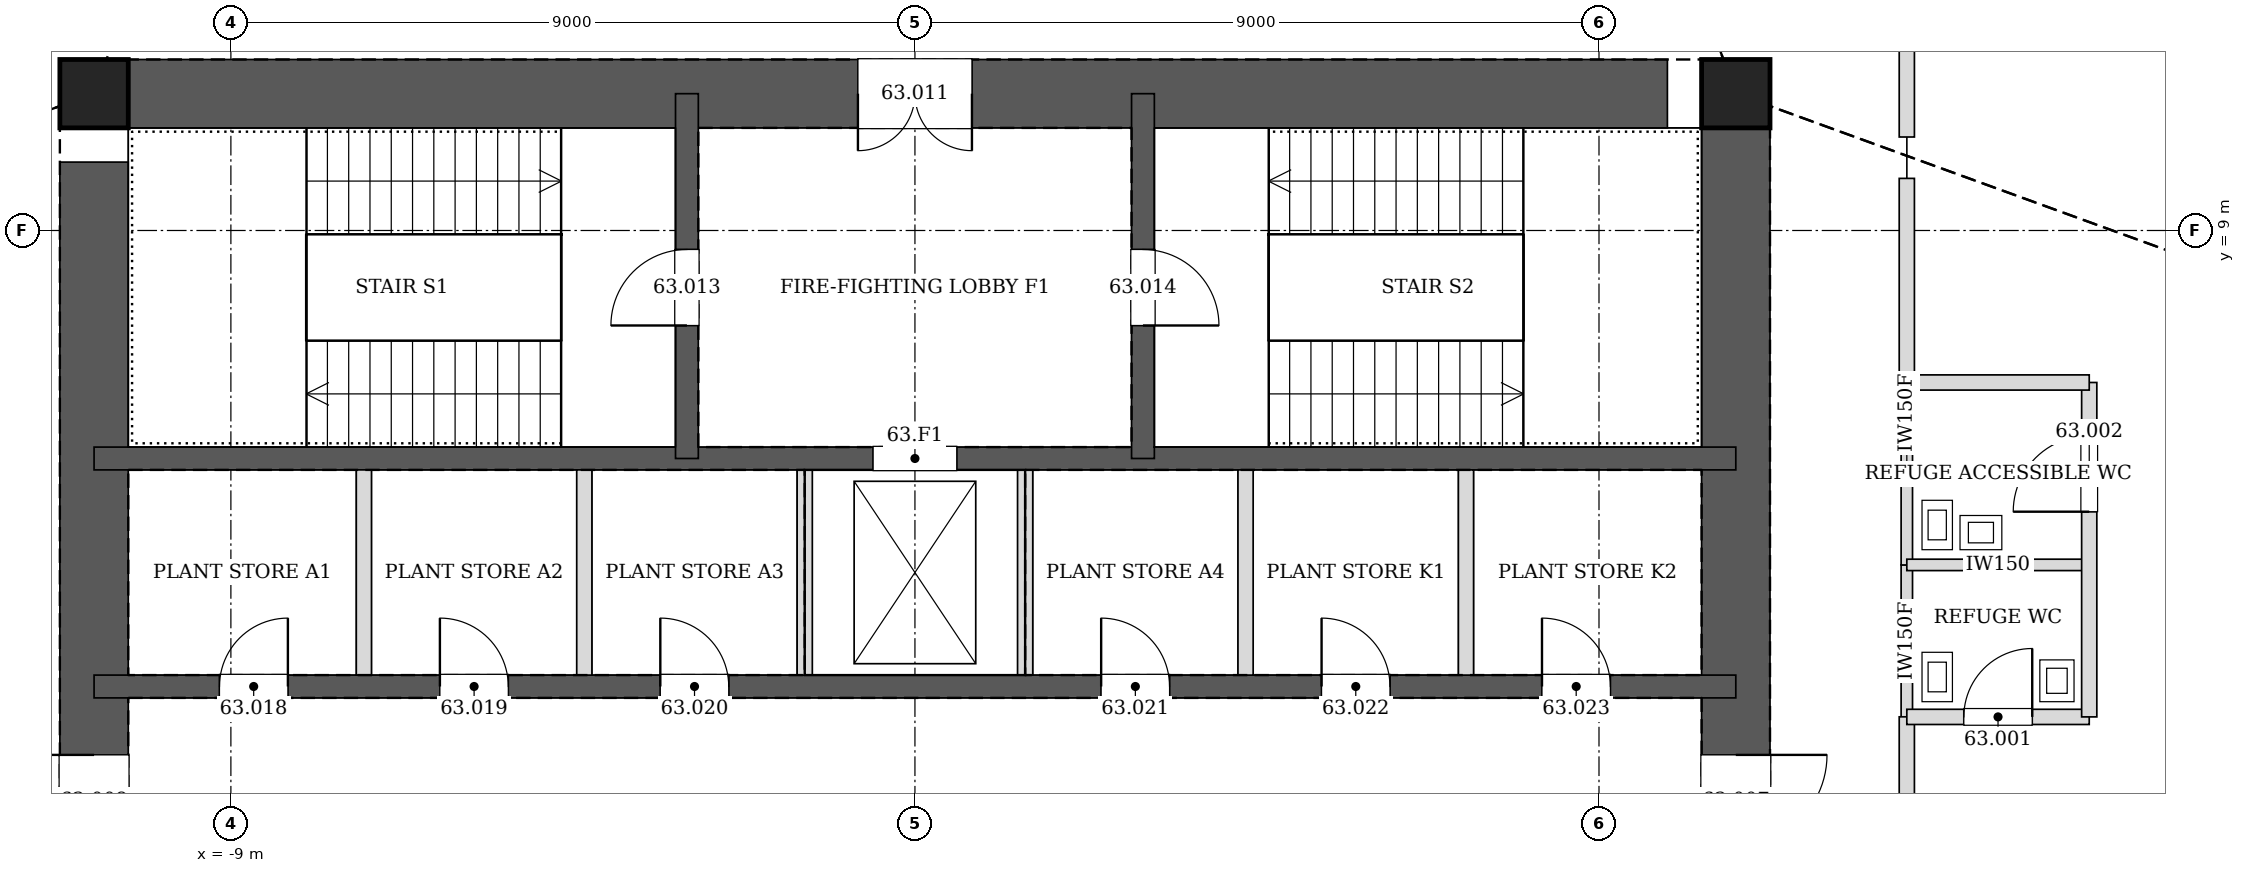
"""IFC4 building model, lengths in metres.
Left out: names, types, materials, properties, quantities, classifications, styles, units other than length and angle.
Written with IfcOpenShell. Run it as: python <this file> out.ifc"""

import sys

from ifc_helpers import new_model, si_unit, direction, frame, frame_2d, origin, origin_2d, place, context, subcontext, project, spatial, rectangle, hollow_rectangle, extrude, element, fill, save


model = new_model("IFC4")
c1 = context("Model", 3, precision=1e-05, world=origin(), true_north=direction((0.0, 1.0)))
c2 = subcontext(c1, "Body", "Model", "MODEL_VIEW")
j1 = project(units=[si_unit("LENGTHUNIT", "METRE"), si_unit("PLANEANGLEUNIT", "RADIAN")], contexts=[c1])
p1 = place(None, origin())
s1 = spatial("IfcSite", under=j1, at=p1, CompositionType="ELEMENT")
p2 = place(p1, origin())
s2 = spatial("IfcBuilding", under=s1, at=p2, CompositionType="ELEMENT")
p3 = place(p2, frame((0.0, 0.0, 261.8)))
s3 = spatial("IfcBuildingStorey", under=s2, at=p3, CompositionType="ELEMENT", Elevation=261.8)
for number, where, z_axis, x_axis in (
    (1, (10.8, 10.8, 0.0), (0.0, 0.0, 1.0), (1.0, 0.0, 0.0)),
    (2, (-10.8, 10.8, 0.0), (0.0, 0.0, 1.0), (1.0, 0.0, 0.0)),
):
    element("IfcColumn", number, at=place(p3, frame(where, z_axis=z_axis, x_axis=x_axis)), inside=s3, PredefinedType="COLUMN", context=c2, shape_type="SweptSolid", body=[
        extrude(hollow_rectangle(XDim=0.9, YDim=0.9, WallThickness=0.04, at=origin_2d()), origin(), (0.0, 0.0, 1.0), 4.5),
    ])
p4 = place(p3, frame((10.8, -10.8, 0.0), z_axis=(0.0, 0.0, 1.0), x_axis=(0.0, 1.0, 0.0)))
e3 = element("IfcWall", 3, at=p4, inside=s3, PredefinedType="SOLIDWALL", context=c2, shape_type="SweptSolid", body=[
    extrude(rectangle(XDim=21.6, YDim=0.9, at=frame_2d((10.8, 0.0))), origin(), (0.0, 0.0, 1.0), 4.5),
])
p5 = place(p4, frame((11.7, 0.0, 0.0)))
e4 = element("IfcOpeningElement", 4, at=p5, cuts=e3, PredefinedType="OPENING", context=c2, shape_type="SweptSolid", body=[
    extrude(rectangle(XDim=1.2, YDim=2.1, at=frame_2d((0.6, 1.05))), frame((0.0, 0.46, 0.0), z_axis=(0.0, -1.0, 0.0), x_axis=(1.0, 0.0, 0.0)), (0.0, 0.0, 1.0), 0.92),
])
p6 = place(p4, frame((8.7, 0.0, 0.0)))
e5 = element("IfcOpeningElement", 5, at=p6, cuts=e3, PredefinedType="OPENING", context=c2, shape_type="SweptSolid", body=[
    extrude(rectangle(XDim=1.2, YDim=2.1, at=frame_2d((0.6, 1.05))), frame((0.0, 0.46, 0.0), z_axis=(0.0, -1.0, 0.0), x_axis=(1.0, 0.0, 0.0)), (0.0, 0.0, 1.0), 0.92),
])
p7 = place(p3, frame((10.8, 10.8, 0.0), z_axis=(0.0, 0.0, 1.0), x_axis=(-1.0, 0.0, 0.0)))
e6 = element("IfcWall", 6, at=p7, inside=s3, PredefinedType="SOLIDWALL", context=c2, shape_type="SweptSolid", body=[
    extrude(rectangle(XDim=21.6, YDim=0.9, at=frame_2d((10.8, 0.0))), origin(), (0.0, 0.0, 1.0), 4.5),
])
p8 = place(p7, frame((10.05, 0.0, 0.0)))
e7 = element("IfcOpeningElement", 7, at=p8, cuts=e6, PredefinedType="OPENING", context=c2, shape_type="SweptSolid", body=[
    extrude(rectangle(XDim=1.5, YDim=2.1, at=frame_2d((0.75, 1.05))), frame((0.0, 0.46, 0.0), z_axis=(0.0, -1.0, 0.0), x_axis=(1.0, 0.0, 0.0)), (0.0, 0.0, 1.0), 0.92),
])
p9 = place(p3, frame((-10.8, 10.8, 0.0), z_axis=(0.0, 0.0, 1.0), x_axis=(0.0, -1.0, 0.0)))
e8 = element("IfcWall", 8, at=p9, inside=s3, PredefinedType="SOLIDWALL", context=c2, shape_type="SweptSolid", body=[
    extrude(rectangle(XDim=21.6, YDim=0.9, at=frame_2d((10.8, 0.0))), origin(), (0.0, 0.0, 1.0), 4.5),
])
p10 = place(p9, frame((8.7, 0.0, 0.0)))
e9 = element("IfcOpeningElement", 9, at=p10, cuts=e8, PredefinedType="OPENING", context=c2, shape_type="SweptSolid", body=[
    extrude(rectangle(XDim=1.2, YDim=2.1, at=frame_2d((0.6, 1.05))), frame((0.0, 0.46, 0.0), z_axis=(0.0, -1.0, 0.0), x_axis=(1.0, 0.0, 0.0)), (0.0, 0.0, 1.0), 0.92),
])
p11 = place(p9, frame((11.7, 0.0, 0.0)))
e10 = element("IfcOpeningElement", 10, at=p11, cuts=e8, PredefinedType="OPENING", context=c2, shape_type="SweptSolid", body=[
    extrude(rectangle(XDim=1.2, YDim=2.1, at=frame_2d((0.6, 1.05))), frame((0.0, 0.46, 0.0), z_axis=(0.0, -1.0, 0.0), x_axis=(1.0, 0.0, 0.0)), (0.0, 0.0, 1.0), 0.92),
])
p12 = place(p3, frame((-10.8, 3.0, 0.0), z_axis=(0.0, 0.0, 1.0), x_axis=(1.0, 0.0, 0.0)))
e11 = element("IfcWall", 11, at=p12, inside=s3, PredefinedType="SOLIDWALL", context=c2, shape_type="SweptSolid", body=[
    extrude(rectangle(XDim=21.6, YDim=0.3, at=frame_2d((10.8, 0.0))), origin(), (0.0, 0.0, 1.0), 4.5),
])
p13 = place(p12, frame((1.65, 0.0, 0.0)))
e12 = element("IfcOpeningElement", 12, at=p13, cuts=e11, PredefinedType="OPENING", context=c2, shape_type="SweptSolid", body=[
    extrude(rectangle(XDim=0.9, YDim=2.1, at=frame_2d((0.45, 1.05))), frame((0.0, 0.16, 0.0), z_axis=(0.0, -1.0, 0.0), x_axis=(1.0, 0.0, 0.0)), (0.0, 0.0, 1.0), 0.32),
])
p14 = place(p12, frame((4.55, 0.0, 0.0)))
e13 = element("IfcOpeningElement", 13, at=p14, cuts=e11, PredefinedType="OPENING", context=c2, shape_type="SweptSolid", body=[
    extrude(rectangle(XDim=0.9, YDim=2.1, at=frame_2d((0.45, 1.05))), frame((0.0, 0.16, 0.0), z_axis=(0.0, -1.0, 0.0), x_axis=(1.0, 0.0, 0.0)), (0.0, 0.0, 1.0), 0.32),
])
p15 = place(p12, frame((7.45, 0.0, 0.0)))
e14 = element("IfcOpeningElement", 14, at=p15, cuts=e11, PredefinedType="OPENING", context=c2, shape_type="SweptSolid", body=[
    extrude(rectangle(XDim=0.9, YDim=2.1, at=frame_2d((0.45, 1.05))), frame((0.0, 0.16, 0.0), z_axis=(0.0, -1.0, 0.0), x_axis=(1.0, 0.0, 0.0)), (0.0, 0.0, 1.0), 0.32),
])
p16 = place(p12, frame((13.25, 0.0, 0.0)))
e15 = element("IfcOpeningElement", 15, at=p16, cuts=e11, PredefinedType="OPENING", context=c2, shape_type="SweptSolid", body=[
    extrude(rectangle(XDim=0.9, YDim=2.1, at=frame_2d((0.45, 1.05))), frame((0.0, 0.16, 0.0), z_axis=(0.0, -1.0, 0.0), x_axis=(1.0, 0.0, 0.0)), (0.0, 0.0, 1.0), 0.32),
])
p17 = place(p12, frame((16.15, 0.0, 0.0)))
e16 = element("IfcOpeningElement", 16, at=p17, cuts=e11, PredefinedType="OPENING", context=c2, shape_type="SweptSolid", body=[
    extrude(rectangle(XDim=0.9, YDim=2.1, at=frame_2d((0.45, 1.05))), frame((0.0, 0.16, 0.0), z_axis=(0.0, -1.0, 0.0), x_axis=(1.0, 0.0, 0.0)), (0.0, 0.0, 1.0), 0.32),
])
p18 = place(p12, frame((19.05, 0.0, 0.0)))
e17 = element("IfcOpeningElement", 17, at=p18, cuts=e11, PredefinedType="OPENING", context=c2, shape_type="SweptSolid", body=[
    extrude(rectangle(XDim=0.9, YDim=2.1, at=frame_2d((0.45, 1.05))), frame((0.0, 0.16, 0.0), z_axis=(0.0, -1.0, 0.0), x_axis=(1.0, 0.0, 0.0)), (0.0, 0.0, 1.0), 0.32),
])
p19 = place(p3, frame((-10.8, 6.0, 0.0), z_axis=(0.0, 0.0, 1.0), x_axis=(1.0, 0.0, 0.0)))
e18 = element("IfcWall", 18, at=p19, inside=s3, PredefinedType="SOLIDWALL", context=c2, shape_type="SweptSolid", body=[
    extrude(rectangle(XDim=21.6, YDim=0.3, at=frame_2d((10.8, 0.0))), origin(), (0.0, 0.0, 1.0), 4.5),
])
p20 = place(p19, frame((10.25, 0.0, 0.0)))
e19 = element("IfcOpeningElement", 19, at=p20, cuts=e18, PredefinedType="OPENING", context=c2, shape_type="SweptSolid", body=[
    extrude(rectangle(XDim=1.1, YDim=2.1, at=frame_2d((0.55, 1.05))), frame((0.0, 0.16, 0.0), z_axis=(0.0, -1.0, 0.0), x_axis=(1.0, 0.0, 0.0)), (0.0, 0.0, 1.0), 0.32),
])
p21 = place(p3, frame((-3.0, 6.0, 0.0), z_axis=(0.0, 0.0, 1.0), x_axis=(0.0, 1.0, 0.0)))
e20 = element("IfcWall", 20, at=p21, inside=s3, PredefinedType="SOLIDWALL", context=c2, shape_type="SweptSolid", body=[
    extrude(rectangle(XDim=4.8, YDim=0.3, at=frame_2d((2.4, 0.0))), origin(), (0.0, 0.0, 1.0), 4.5),
])
p22 = place(p21, frame((1.75, 0.0, 0.0)))
e21 = element("IfcOpeningElement", 21, at=p22, cuts=e20, PredefinedType="OPENING", context=c2, shape_type="SweptSolid", body=[
    extrude(rectangle(XDim=1.0, YDim=2.1, at=frame_2d((0.5, 1.05))), frame((0.0, 0.16, 0.0), z_axis=(0.0, -1.0, 0.0), x_axis=(1.0, 0.0, 0.0)), (0.0, 0.0, 1.0), 0.32),
])
p23 = place(p3, frame((3.0, 6.0, 0.0), z_axis=(0.0, 0.0, 1.0), x_axis=(0.0, 1.0, 0.0)))
e22 = element("IfcWall", 22, at=p23, inside=s3, PredefinedType="SOLIDWALL", context=c2, shape_type="SweptSolid", body=[
    extrude(rectangle(XDim=4.8, YDim=0.3, at=frame_2d((2.4, 0.0))), origin(), (0.0, 0.0, 1.0), 4.5),
])
p24 = place(p23, frame((1.75, 0.0, 0.0)))
e23 = element("IfcOpeningElement", 23, at=p24, cuts=e22, PredefinedType="OPENING", context=c2, shape_type="SweptSolid", body=[
    extrude(rectangle(XDim=1.0, YDim=2.1, at=frame_2d((0.5, 1.05))), frame((0.0, 0.16, 0.0), z_axis=(0.0, -1.0, 0.0), x_axis=(1.0, 0.0, 0.0)), (0.0, 0.0, 1.0), 0.32),
])
p25 = place(p3, frame((13.05, 2.599, 0.0), z_axis=(0.0, 0.0, 1.0), x_axis=(0.0, 1.0, 0.0)))
e24 = element("IfcWall", 24, at=p25, inside=s3, PredefinedType="PARTITIONING", context=c2, shape_type="SweptSolid", body=[
    extrude(rectangle(XDim=2.002, YDim=0.15, at=frame_2d((1.001, 0.0))), origin(), (0.0, 0.0, 1.0), 4.25),
])
p26 = place(p3, frame((13.05, 4.599, 0.0), z_axis=(0.0, 0.0, 1.0), x_axis=(0.0, 1.0, 0.0)))
e25 = element("IfcWall", 25, at=p26, inside=s3, PredefinedType="PARTITIONING", context=c2, shape_type="SweptSolid", body=[
    extrude(rectangle(XDim=2.402, YDim=0.15, at=frame_2d((1.201, 0.0))), origin(), (0.0, 0.0, 1.0), 4.25),
])
p27 = place(p3, frame((13.05, -10.228, 0.0), z_axis=(0.0, 0.0, 1.0), x_axis=(0.0, 1.0, 0.0)))
e26 = element("IfcWall", 26, at=p27, inside=s3, PredefinedType="PARTITIONING", context=c2, shape_type="SweptSolid", body=[
    extrude(rectangle(XDim=12.829, YDim=0.2, at=frame_2d((6.415, 0.0))), origin(), (0.0, 0.0, 1.0), 3.14),
])
p28 = place(p27, frame((5.786, 0.0, 0.0)))
e27 = element("IfcOpeningElement", 27, at=p28, cuts=e26, PredefinedType="OPENING", context=c2, shape_type="SweptSolid", body=[
    extrude(rectangle(XDim=1.8, YDim=2.4, at=frame_2d((0.9, 1.2))), frame((0.0, 0.11, 0.0), z_axis=(0.0, -1.0, 0.0), x_axis=(1.0, 0.0, 0.0)), (0.0, 0.0, 1.0), 0.22),
])
p29 = place(p3, frame((13.05, 6.999, 0.0), z_axis=(0.0, 0.0, 1.0), x_axis=(0.0, 1.0, 0.0)))
e28 = element("IfcWall", 28, at=p29, inside=s3, PredefinedType="PARTITIONING", context=c2, shape_type="SweptSolid", body=[
    extrude(rectangle(XDim=2.687, YDim=0.2, at=frame_2d((1.343, 0.0))), origin(), (0.0, 0.0, 1.0), 3.394),
])
p30 = place(p3, frame((13.05, 10.23, 0.0), z_axis=(0.0, 0.0, 1.0), x_axis=(0.0, 1.0, 0.0)))
e29 = element("IfcWall", 29, at=p30, inside=s3, PredefinedType="PARTITIONING", context=c2, shape_type="SweptSolid", body=[
    extrude(rectangle(XDim=2.82, YDim=0.2, at=frame_2d((1.41, 0.0))), origin(), (0.0, 0.0, 1.0), 3.399),
])
p31 = place(p3, frame((15.45, 4.6, 0.0), z_axis=(0.0, 0.0, 1.0), x_axis=(-1.0, 0.0, 0.0)))
e30 = element("IfcWall", 30, at=p31, inside=s3, PredefinedType="PARTITIONING", context=c2, shape_type="SweptSolid", body=[
    extrude(rectangle(XDim=2.4, YDim=0.15, at=frame_2d((1.2, 0.0))), origin(), (0.0, 0.0, 1.0), 4.25),
])
p32 = place(p3, frame((13.05, 2.6, 0.0), z_axis=(0.0, 0.0, 1.0), x_axis=(1.0, 0.0, 0.0)))
e31 = element("IfcWall", 31, at=p32, inside=s3, PredefinedType="PARTITIONING", context=c2, shape_type="SweptSolid", body=[
    extrude(rectangle(XDim=2.4, YDim=0.2, at=frame_2d((1.2, 0.0))), origin(), (0.0, 0.0, 1.0), 4.25),
])
p33 = place(p32, frame((0.75, 0.0, 0.0)))
e32 = element("IfcOpeningElement", 32, at=p33, cuts=e31, PredefinedType="OPENING", context=c2, shape_type="SweptSolid", body=[
    extrude(rectangle(XDim=0.9, YDim=2.1, at=frame_2d((0.45, 1.05))), frame((0.0, 0.11, 0.0), z_axis=(0.0, -1.0, 0.0), x_axis=(1.0, 0.0, 0.0)), (0.0, 0.0, 1.0), 0.22),
])
p34 = place(p3, frame((15.45, 2.6, 0.0), z_axis=(0.0, 0.0, 1.0), x_axis=(0.0, 1.0, 0.0)))
e33 = element("IfcWall", 33, at=p34, inside=s3, PredefinedType="PARTITIONING", context=c2, shape_type="SweptSolid", body=[
    extrude(rectangle(XDim=4.4, YDim=0.2, at=frame_2d((2.2, 0.0))), origin(), (0.0, 0.0, 1.0), 4.25),
])
p35 = place(p34, frame((2.7, 0.0, 0.0)))
e34 = element("IfcOpeningElement", 34, at=p35, cuts=e33, PredefinedType="OPENING", context=c2, shape_type="SweptSolid", body=[
    extrude(rectangle(XDim=1.0, YDim=2.1, at=frame_2d((0.5, 1.05))), frame((0.0, 0.11, 0.0), z_axis=(0.0, -1.0, 0.0), x_axis=(1.0, 0.0, 0.0)), (0.0, 0.0, 1.0), 0.22),
])
p36 = place(p3, frame((15.45, 7.0, 0.0), z_axis=(0.0, 0.0, 1.0), x_axis=(-1.0, 0.0, 0.0)))
e35 = element("IfcWall", 35, at=p36, inside=s3, PredefinedType="PARTITIONING", context=c2, shape_type="SweptSolid", body=[
    extrude(rectangle(XDim=2.4, YDim=0.2, at=frame_2d((1.2, 0.0))), origin(), (0.0, 0.0, 1.0), 4.25),
])
for number, where, z_axis, x_axis in (
    (36, (-7.25, 3.15, 0.0), (0.0, 0.0, 1.0), (0.0, 1.0, 0.0)),
    (37, (-4.35, 3.15, 0.0), (0.0, 0.0, 1.0), (0.0, 1.0, 0.0)),
    (38, (-1.45, 3.15, 0.0), (0.0, 0.0, 1.0), (0.0, 1.0, 0.0)),
    (39, (1.45, 3.15, 0.0), (0.0, 0.0, 1.0), (0.0, 1.0, 0.0)),
    (40, (4.35, 3.15, 0.0), (0.0, 0.0, 1.0), (0.0, 1.0, 0.0)),
    (41, (7.25, 3.15, 0.0), (0.0, 0.0, 1.0), (0.0, 1.0, 0.0)),
):
    element("IfcWall", number, at=place(p3, frame(where, z_axis=z_axis, x_axis=x_axis)), inside=s3, PredefinedType="PARTITIONING", context=c2, shape_type="SweptSolid", body=[
        extrude(rectangle(XDim=2.7, YDim=0.2, at=frame_2d((1.35, 0.0))), origin(), (0.0, 0.0, 1.0), 4.25),
    ])
p37 = place(p33, origin())
e42 = element("IfcDoor", 42, at=p37, inside=s3, OperationType="SINGLE_SWING_RIGHT", PredefinedType="DOOR", context=c2, shape_type="SweptSolid", body=[
    extrude(rectangle(XDim=0.9, YDim=2.1, at=frame_2d((0.45, 1.05))), frame((0.0, 0.025, 0.0), z_axis=(0.0, -1.0, 0.0), x_axis=(1.0, 0.0, 0.0)), (0.0, 0.0, 1.0), 0.05),
])
fill(e32, e42)
p38 = place(p35, origin())
e43 = element("IfcDoor", 43, at=p38, inside=s3, OperationType="SINGLE_SWING_LEFT", PredefinedType="DOOR", context=c2, shape_type="SweptSolid", body=[
    extrude(rectangle(XDim=1.0, YDim=2.1, at=frame_2d((0.5, 1.05))), frame((0.0, 0.025, 0.0), z_axis=(0.0, -1.0, 0.0), x_axis=(1.0, 0.0, 0.0)), (0.0, 0.0, 1.0), 0.05),
])
fill(e34, e43)
p39 = place(p5, frame((1.2, 0.0, 0.0), z_axis=(0.0, 0.0, 1.0), x_axis=(-1.0, 0.0, 0.0)))
e44 = element("IfcDoor", 44, at=p39, inside=s3, OperationType="SINGLE_SWING_LEFT", PredefinedType="DOOR", context=c2, shape_type="SweptSolid", body=[
    extrude(rectangle(XDim=1.2, YDim=2.1, at=frame_2d((0.6, 1.05))), frame((0.0, 0.025, 0.0), z_axis=(0.0, -1.0, 0.0), x_axis=(1.0, 0.0, 0.0)), (0.0, 0.0, 1.0), 0.05),
])
fill(e4, e44)
p40 = place(p10, frame((1.2, 0.0, 0.0), z_axis=(0.0, 0.0, 1.0), x_axis=(-1.0, 0.0, 0.0)))
e45 = element("IfcDoor", 45, at=p40, inside=s3, OperationType="SINGLE_SWING_RIGHT", PredefinedType="DOOR", context=c2, shape_type="SweptSolid", body=[
    extrude(rectangle(XDim=1.2, YDim=2.1, at=frame_2d((0.6, 1.05))), frame((0.0, 0.025, 0.0), z_axis=(0.0, -1.0, 0.0), x_axis=(1.0, 0.0, 0.0)), (0.0, 0.0, 1.0), 0.05),
])
fill(e9, e45)
p41 = place(p8, origin())
e46 = element("IfcDoor", 46, at=p41, inside=s3, OperationType="DOUBLE_DOOR_SINGLE_SWING", PredefinedType="DOOR", context=c2, shape_type="SweptSolid", body=[
    extrude(rectangle(XDim=1.5, YDim=2.1, at=frame_2d((0.75, 1.05))), frame((0.0, 0.025, 0.0), z_axis=(0.0, -1.0, 0.0), x_axis=(1.0, 0.0, 0.0)), (0.0, 0.0, 1.0), 0.05),
])
fill(e7, e46)
p42 = place(p22, origin())
e47 = element("IfcDoor", 47, at=p42, inside=s3, OperationType="SINGLE_SWING_LEFT", PredefinedType="DOOR", context=c2, shape_type="SweptSolid", body=[
    extrude(rectangle(XDim=1.0, YDim=2.1, at=frame_2d((0.5, 1.05))), frame((0.0, 0.025, 0.0), z_axis=(0.0, -1.0, 0.0), x_axis=(1.0, 0.0, 0.0)), (0.0, 0.0, 1.0), 0.05),
])
fill(e21, e47)
p43 = place(p24, frame((1.0, 0.0, 0.0), z_axis=(0.0, 0.0, 1.0), x_axis=(-1.0, 0.0, 0.0)))
e48 = element("IfcDoor", 48, at=p43, inside=s3, OperationType="SINGLE_SWING_RIGHT", PredefinedType="DOOR", context=c2, shape_type="SweptSolid", body=[
    extrude(rectangle(XDim=1.0, YDim=2.1, at=frame_2d((0.5, 1.05))), frame((0.0, 0.025, 0.0), z_axis=(0.0, -1.0, 0.0), x_axis=(1.0, 0.0, 0.0)), (0.0, 0.0, 1.0), 0.05),
])
fill(e23, e48)
p44 = place(p13, origin())
e49 = element("IfcDoor", 49, at=p44, inside=s3, OperationType="SINGLE_SWING_RIGHT", PredefinedType="DOOR", context=c2, shape_type="SweptSolid", body=[
    extrude(rectangle(XDim=0.9, YDim=2.1, at=frame_2d((0.45, 1.05))), frame((0.0, 0.025, 0.0), z_axis=(0.0, -1.0, 0.0), x_axis=(1.0, 0.0, 0.0)), (0.0, 0.0, 1.0), 0.05),
])
fill(e12, e49)
p45 = place(p14, origin())
e50 = element("IfcDoor", 50, at=p45, inside=s3, OperationType="SINGLE_SWING_LEFT", PredefinedType="DOOR", context=c2, shape_type="SweptSolid", body=[
    extrude(rectangle(XDim=0.9, YDim=2.1, at=frame_2d((0.45, 1.05))), frame((0.0, 0.025, 0.0), z_axis=(0.0, -1.0, 0.0), x_axis=(1.0, 0.0, 0.0)), (0.0, 0.0, 1.0), 0.05),
])
fill(e13, e50)
p46 = place(p15, origin())
e51 = element("IfcDoor", 51, at=p46, inside=s3, OperationType="SINGLE_SWING_LEFT", PredefinedType="DOOR", context=c2, shape_type="SweptSolid", body=[
    extrude(rectangle(XDim=0.9, YDim=2.1, at=frame_2d((0.45, 1.05))), frame((0.0, 0.025, 0.0), z_axis=(0.0, -1.0, 0.0), x_axis=(1.0, 0.0, 0.0)), (0.0, 0.0, 1.0), 0.05),
])
fill(e14, e51)
p47 = place(p16, origin())
e52 = element("IfcDoor", 52, at=p47, inside=s3, OperationType="SINGLE_SWING_LEFT", PredefinedType="DOOR", context=c2, shape_type="SweptSolid", body=[
    extrude(rectangle(XDim=0.9, YDim=2.1, at=frame_2d((0.45, 1.05))), frame((0.0, 0.025, 0.0), z_axis=(0.0, -1.0, 0.0), x_axis=(1.0, 0.0, 0.0)), (0.0, 0.0, 1.0), 0.05),
])
fill(e15, e52)
p48 = place(p17, origin())
e53 = element("IfcDoor", 53, at=p48, inside=s3, OperationType="SINGLE_SWING_LEFT", PredefinedType="DOOR", context=c2, shape_type="SweptSolid", body=[
    extrude(rectangle(XDim=0.9, YDim=2.1, at=frame_2d((0.45, 1.05))), frame((0.0, 0.025, 0.0), z_axis=(0.0, -1.0, 0.0), x_axis=(1.0, 0.0, 0.0)), (0.0, 0.0, 1.0), 0.05),
])
fill(e16, e53)
p49 = place(p18, origin())
e54 = element("IfcDoor", 54, at=p49, inside=s3, OperationType="SINGLE_SWING_LEFT", PredefinedType="DOOR", context=c2, shape_type="SweptSolid", body=[
    extrude(rectangle(XDim=0.9, YDim=2.1, at=frame_2d((0.45, 1.05))), frame((0.0, 0.025, 0.0), z_axis=(0.0, -1.0, 0.0), x_axis=(1.0, 0.0, 0.0)), (0.0, 0.0, 1.0), 0.05),
])
fill(e17, e54)
p50 = place(p20, origin())
e55 = element("IfcDoor", 55, at=p50, inside=s3, OperationType="DOUBLE_DOOR_SLIDING", PredefinedType="DOOR", context=c2, shape_type="SweptSolid", body=[
    extrude(rectangle(XDim=1.1, YDim=2.1, at=frame_2d((0.55, 1.05))), frame((0.0, 0.025, 0.0), z_axis=(0.0, -1.0, 0.0), x_axis=(1.0, 0.0, 0.0)), (0.0, 0.0, 1.0), 0.05),
])
fill(e19, e55)
save(model, sys.argv[1])
